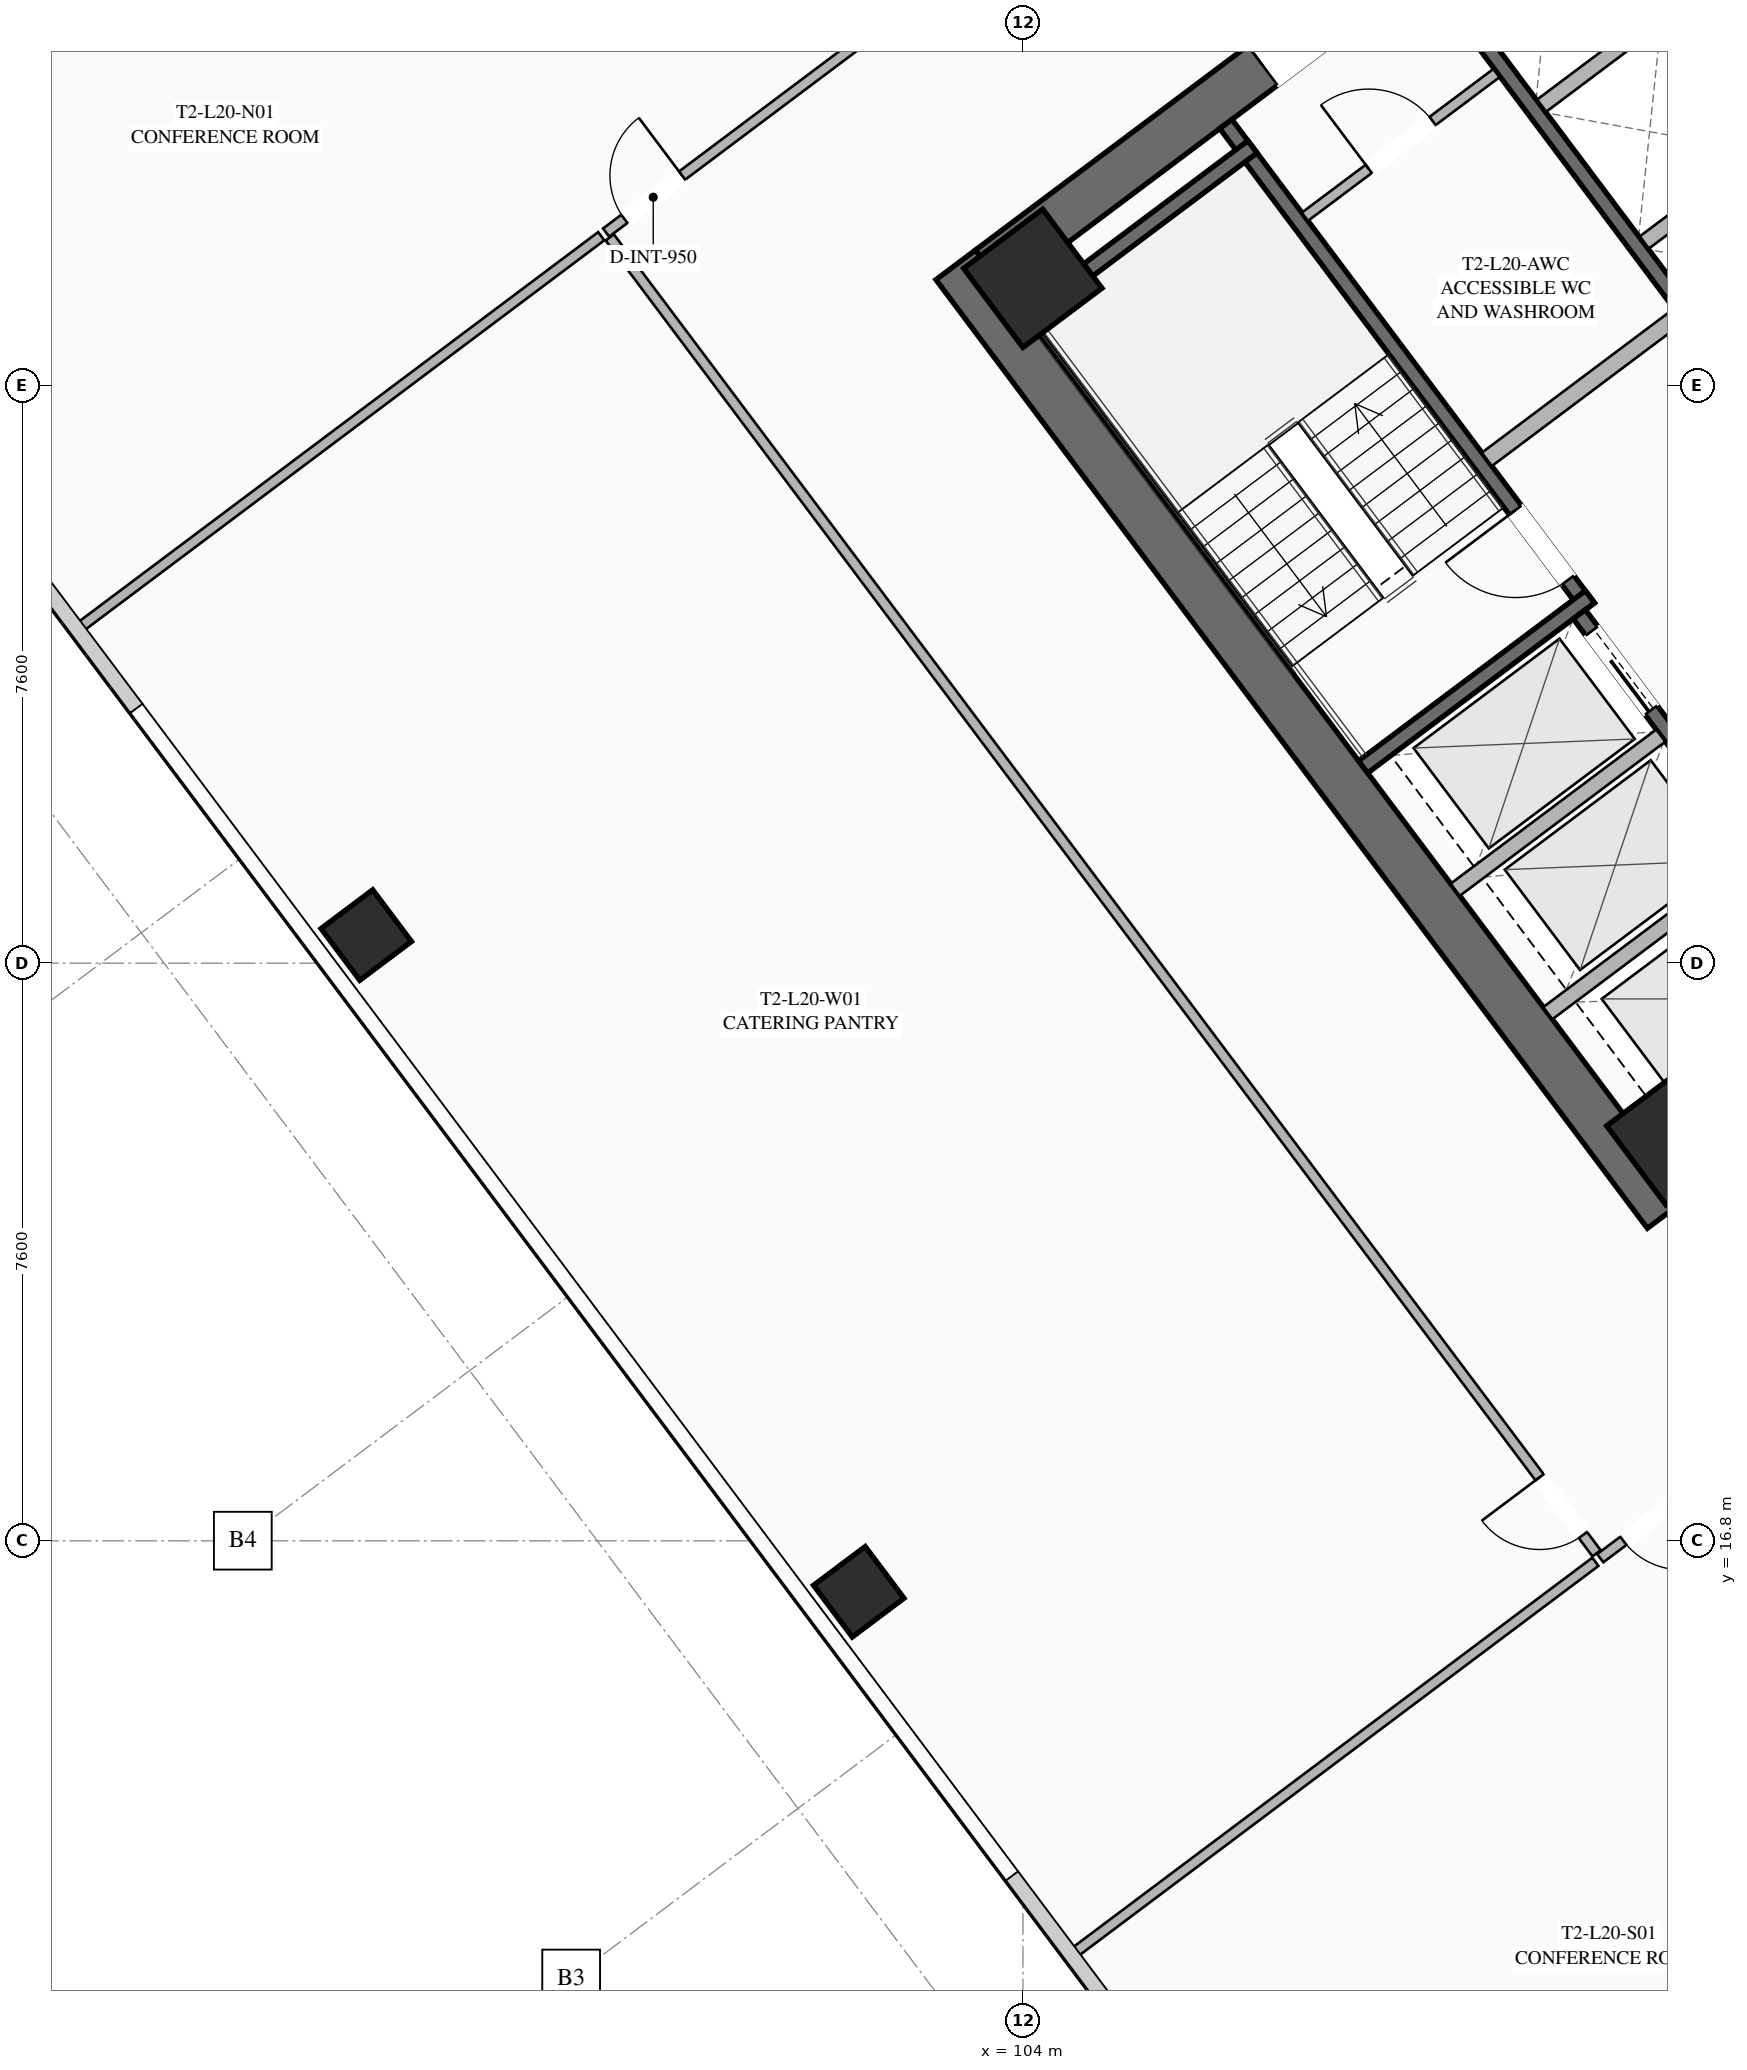
"""IFC4 building model, lengths in metres.
Left out: names, types, materials, properties, quantities, classifications, styles, units other than length and angle.
Written with IfcOpenShell. Run it as: python <this file> out.ifc"""

import sys

from ifc_helpers import new_model, si_unit, direction, frame, frame_2d, origin, origin_2d, place, context, subcontext, project, spatial, rectangle, hollow_rectangle, extrude, element, fill, save


model = new_model("IFC4")
c1 = context("Model", 3, precision=1e-05, world=origin(), true_north=direction((0.0, 1.0)))
c2 = subcontext(c1, "Body", "Model", "MODEL_VIEW")
j1 = project(units=[si_unit("LENGTHUNIT", "METRE"), si_unit("PLANEANGLEUNIT", "RADIAN")], contexts=[c1])
p1 = place(None, origin())
s1 = spatial("IfcSite", under=j1, at=p1, CompositionType="ELEMENT")
p2 = place(p1, origin())
s2 = spatial("IfcBuilding", under=s1, at=p2, CompositionType="ELEMENT")
p3 = place(p2, frame((0.0, 0.0, 77.85)))
s3 = spatial("IfcBuildingStorey", under=s2, at=p3, CompositionType="ELEMENT", Elevation=77.85)
p4 = place(p3, frame((112.476, 21.107, 0.0), z_axis=(0.0, 0.0, 1.0), x_axis=(-0.600005007985, 0.799996243986, 0.0)))
e1 = element("IfcWall", 1, at=p4, inside=s3, PredefinedType="SHEAR", context=c2, shape_type="SweptSolid", body=[
    extrude(rectangle(XDim=15.6, YDim=0.65, at=frame_2d((7.8, 0.0))), origin(), (0.0, 0.0, 1.0), 3.55),
])
p5 = place(p3, frame((124.429, 30.478, 0.0), z_axis=(0.0, 0.0, 1.0), x_axis=(-0.799998028465, -0.600002628705, 0.0)))
e2 = element("IfcWall", 2, at=p5, inside=s3, PredefinedType="SHEAR", context=c2, shape_type="SweptSolid", body=[
    extrude(rectangle(XDim=14.86, YDim=0.65, at=frame_2d((7.43, 0.0))), origin(), (0.0, 0.0, 1.0), 3.55),
])
p6 = place(p5, frame((9.13, 0.0, 0.0)))
e3 = element("IfcOpeningElement", 3, at=p6, cuts=e2, PredefinedType="OPENING", context=c2, shape_type="SweptSolid", body=[
    extrude(rectangle(XDim=1.25, YDim=2.25, at=frame_2d((0.625, 1.125))), frame((0.0, 0.335, 0.0), z_axis=(0.0, -1.0, 0.0), x_axis=(1.0, 0.0, 0.0)), (0.0, 0.0, 1.0), 0.67),
])
p7 = place(p5, frame((4.08, 0.0, 0.0)))
e4 = element("IfcOpeningElement", 4, at=p7, cuts=e2, PredefinedType="OPENING", context=c2, shape_type="SweptSolid", body=[
    extrude(rectangle(XDim=1.25, YDim=2.25, at=frame_2d((0.625, 1.125))), frame((0.0, 0.335, 0.0), z_axis=(0.0, -1.0, 0.0), x_axis=(1.0, 0.0, 0.0)), (0.0, 0.0, 1.0), 0.67),
])
p8 = place(p3, frame((103.571, 33.522, 0.0), z_axis=(0.0, 0.0, 1.0), x_axis=(0.799998028465, 0.600002628705, 0.0)))
e5 = element("IfcWall", 5, at=p8, inside=s3, PredefinedType="SHEAR", context=c2, shape_type="SweptSolid", body=[
    extrude(rectangle(XDim=14.86, YDim=0.65, at=frame_2d((7.43, 0.0))), origin(), (0.0, 0.0, 1.0), 3.55),
])
p9 = place(p8, frame((4.48, 0.0, 0.0)))
e6 = element("IfcOpeningElement", 6, at=p9, cuts=e5, PredefinedType="OPENING", context=c2, shape_type="SweptSolid", body=[
    extrude(rectangle(XDim=1.25, YDim=2.25, at=frame_2d((0.625, 1.125))), frame((0.0, 0.335, 0.0), z_axis=(0.0, -1.0, 0.0), x_axis=(1.0, 0.0, 0.0)), (0.0, 0.0, 1.0), 0.67),
])
p10 = place(p8, frame((9.53, 0.0, 0.0)))
e7 = element("IfcOpeningElement", 7, at=p10, cuts=e5, PredefinedType="OPENING", context=c2, shape_type="SweptSolid", body=[
    extrude(rectangle(XDim=1.25, YDim=2.25, at=frame_2d((0.625, 1.125))), frame((0.0, 0.335, 0.0), z_axis=(0.0, -1.0, 0.0), x_axis=(1.0, 0.0, 0.0)), (0.0, 0.0, 1.0), 0.67),
])
for number, where, z_axis, x_axis in (
    (8, (112.59, 22.13, 0.0), (0.0, 0.0, 1.0), (0.8, 0.6, 0.0)),
    (9, (104.13, 33.41, 0.0), (0.0, 0.0, 1.0), (0.8, 0.6, 0.0)),
):
    element("IfcColumn", number, at=place(p3, frame(where, z_axis=z_axis, x_axis=x_axis)), inside=s3, PredefinedType="COLUMN", context=c2, shape_type="SweptSolid", body=[
        extrude(hollow_rectangle(XDim=1.3, YDim=1.3, WallThickness=0.05, at=origin_2d()), origin(), (0.0, 0.0, 1.0), 3.35),
    ])
for number, where, z_axis, x_axis in (
    (10, (95.36, 24.77, 0.0), (0.0, 0.0, 1.0), (0.8, 0.6, 0.0)),
    (11, (101.84, 16.13, 0.0), (0.0, 0.0, 1.0), (0.8, 0.6, 0.0)),
):
    element("IfcColumn", number, at=place(p3, frame(where, z_axis=z_axis, x_axis=x_axis)), inside=s3, PredefinedType="COLUMN", context=c2, shape_type="SweptSolid", body=[
        extrude(hollow_rectangle(XDim=0.85, YDim=0.85, WallThickness=0.035, at=origin_2d()), origin(), (0.0, 0.0, 1.0), 3.35),
    ])
p11 = place(p3, frame((111.44, 29.08, 0.0), z_axis=(0.0, 0.0, 1.0), x_axis=(-0.600009827119, 0.799992629566, 0.0)))
e12 = element("IfcWall", 12, at=p11, inside=s3, PredefinedType="SHEAR", context=c2, shape_type="SweptSolid", body=[
    extrude(rectangle(XDim=7.95, YDim=0.2, at=frame_2d((3.975, 0.0))), origin(), (0.0, 0.0, 1.0), 3.35),
])
p12 = place(p11, frame((0.45, 0.0, 0.0)))
e13 = element("IfcOpeningElement", 13, at=p12, cuts=e12, PredefinedType="OPENING", context=c2, shape_type="SweptSolid", body=[
    extrude(rectangle(XDim=1.15, YDim=2.2, at=frame_2d((0.575, 1.1))), frame((0.0, 0.11, 0.0), z_axis=(0.0, -1.0, 0.0), x_axis=(1.0, 0.0, 0.0)), (0.0, 0.0, 1.0), 0.22),
])
for number, where, z_axis, x_axis in (
    (14, (108.476, 26.982, 0.0), (0.0, 0.0, 1.0), (0.8, 0.6, 0.0)),
    (15, (104.036, 32.902, 0.0), (0.0, 0.0, 1.0), (0.8, 0.6, 0.0)),
):
    element("IfcWall", number, at=place(p3, frame(where, z_axis=z_axis, x_axis=x_axis)), inside=s3, PredefinedType="SHEAR", context=c2, shape_type="SweptSolid", body=[
        extrude(rectangle(XDim=3.73, YDim=0.2, at=frame_2d((1.865, 0.0))), origin(), (0.0, 0.0, 1.0), 3.35),
    ])
p13 = place(p3, frame((117.938, 26.016, 0.0), z_axis=(0.0, 0.0, 1.0), x_axis=(-0.600005463273, 0.799995902516, 0.0)))
e16 = element("IfcWall", 16, at=p13, inside=s3, PredefinedType="SHEAR", context=c2, shape_type="SweptSolid", body=[
    extrude(rectangle(XDim=14.3, YDim=0.2, at=frame_2d((7.15, 0.0))), origin(), (0.0, 0.0, 1.0), 3.35),
])
p14 = place(p3, frame((110.104, 31.028, 0.0), z_axis=(0.0, 0.0, 1.0), x_axis=(0.800018601094, 0.59997519774, 0.0)))
e17 = element("IfcWall", 17, at=p14, inside=s3, PredefinedType="SOLIDWALL", context=c2, shape_type="SweptSolid", body=[
    extrude(rectangle(XDim=3.15, YDim=0.22, at=frame_2d((1.575, 0.0))), origin(), (0.0, 0.0, 1.0), 2.703),
])
p15 = place(p3, frame((115.13, 23.91, 0.0), z_axis=(0.0, 0.0, 1.0), x_axis=(-0.599975393228, 0.800018454488, 0.0)))
e18 = element("IfcWall", 18, at=p15, inside=s3, PredefinedType="SHEAR", context=c2, shape_type="SweptSolid", body=[
    extrude(rectangle(XDim=6.35, YDim=0.2, at=frame_2d((3.175, 0.0))), origin(), (0.0, 0.0, 1.0), 3.35),
])
p16 = place(p15, frame((4.775, 0.0, 0.0)))
e19 = element("IfcOpeningElement", 19, at=p16, cuts=e18, PredefinedType="OPENING", context=c2, shape_type="SweptSolid", body=[
    extrude(rectangle(XDim=1.3, YDim=2.25, at=frame_2d((0.65, 1.125))), frame((0.0, 0.11, 0.0), z_axis=(0.0, -1.0, 0.0), x_axis=(1.0, 0.0, 0.0)), (0.0, 0.0, 1.0), 0.22),
])
p17 = place(p15, frame((2.775, 0.0, 0.0)))
e20 = element("IfcOpeningElement", 20, at=p17, cuts=e18, PredefinedType="OPENING", context=c2, shape_type="SweptSolid", body=[
    extrude(rectangle(XDim=1.3, YDim=2.25, at=frame_2d((0.65, 1.125))), frame((0.0, 0.11, 0.0), z_axis=(0.0, -1.0, 0.0), x_axis=(1.0, 0.0, 0.0)), (0.0, 0.0, 1.0), 0.22),
])
p18 = place(p15, frame((0.575, 0.0, 0.0)))
e21 = element("IfcOpeningElement", 21, at=p18, cuts=e18, PredefinedType="OPENING", context=c2, shape_type="SweptSolid", body=[
    extrude(rectangle(XDim=1.3, YDim=2.25, at=frame_2d((0.65, 1.125))), frame((0.0, 0.11, 0.0), z_axis=(0.0, -1.0, 0.0), x_axis=(1.0, 0.0, 0.0)), (0.0, 0.0, 1.0), 0.22),
])
for number, where, z_axis, x_axis in (
    (22, (110.906, 23.742, 0.0), (0.0, 0.0, 1.0), (0.8, 0.6, 0.0)),
    (23, (109.688, 25.366, 0.0), (0.0, 0.0, 1.0), (0.8, 0.6, 0.0)),
):
    element("IfcWall", number, at=place(p3, frame(where, z_axis=z_axis, x_axis=x_axis)), inside=s3, PredefinedType="SOLIDWALL", context=c2, shape_type="SweptSolid", body=[
        extrude(rectangle(XDim=3.38, YDim=0.2, at=frame_2d((1.69, 0.0))), origin(), (0.0, 0.0, 1.0), 3.35),
    ])
p19 = place(p3, frame((107.71, 34.22, 0.0), z_axis=(0.0, 0.0, 1.0), x_axis=(0.799981399002, 0.60002480053, 0.0)))
e24 = element("IfcWall", 24, at=p19, inside=s3, PredefinedType="PARTITIONING", context=c2, shape_type="SweptSolid", body=[
    extrude(rectangle(XDim=3.15, YDim=0.135, at=frame_2d((1.575, 0.0))), origin(), (0.0, 0.0, 1.0), 2.703),
])
p20 = place(p19, frame((1.05, 0.0, 0.0)))
e25 = element("IfcOpeningElement", 25, at=p20, cuts=e24, PredefinedType="OPENING", context=c2, shape_type="SweptSolid", body=[
    extrude(rectangle(XDim=1.05, YDim=2.2, at=frame_2d((0.525, 1.1))), frame((0.0, 0.077, 0.0), z_axis=(0.0, -1.0, 0.0), x_axis=(1.0, 0.0, 0.0)), (0.0, 0.0, 1.0), 0.155),
])
p21 = place(p3, frame((115.11, 33.27, 0.0), z_axis=(0.0, 0.0, 1.0), x_axis=(-0.600011488909, 0.79999138319, 0.0)))
e26 = element("IfcWall", 26, at=p21, inside=s3, PredefinedType="SOLIDWALL", context=c2, shape_type="SweptSolid", body=[
    extrude(rectangle(XDim=6.8, YDim=0.2, at=frame_2d((3.4, 0.0))), origin(), (0.0, 0.0, 1.0), 3.35),
])
p22 = place(p3, frame((112.176, 33.882, 0.0), z_axis=(0.0, 0.0, 1.0), x_axis=(0.8, 0.6, 0.0)))
e27 = element("IfcWall", 27, at=p22, inside=s3, PredefinedType="SOLIDWALL", context=c2, shape_type="SweptSolid", body=[
    extrude(rectangle(XDim=1.88, YDim=0.2, at=frame_2d((0.94, 0.0))), origin(), (0.0, 0.0, 1.0), 3.35),
])
p23 = place(p3, frame((110.826, 35.682, 0.0), z_axis=(0.0, 0.0, 1.0), x_axis=(0.799984418148, 0.600020775241, 0.0)))
e28 = element("IfcWall", 28, at=p23, inside=s3, PredefinedType="SOLIDWALL", context=c2, shape_type="SweptSolid", body=[
    extrude(rectangle(XDim=1.88, YDim=0.2, at=frame_2d((0.94, 0.0))), origin(), (0.0, 0.0, 1.0), 3.35),
])
p24 = place(p3, frame((98.516, 34.012, 0.0), z_axis=(0.0, 0.0, 1.0), x_axis=(0.8, 0.6, 0.0)))
e29 = element("IfcWall", 29, at=p24, inside=s3, PredefinedType="PARTITIONING", context=c2, shape_type="SweptSolid", body=[
    extrude(rectangle(XDim=28.23, YDim=0.135, at=frame_2d((14.115, 0.0))), origin(), (0.0, 0.0, 1.0), 2.703),
])
p25 = place(p24, frame((0.3, 0.0, 0.0)))
e30 = element("IfcOpeningElement", 30, at=p25, cuts=e29, PredefinedType="OPENING", context=c2, shape_type="SweptSolid", body=[
    extrude(rectangle(XDim=0.95, YDim=2.05, at=frame_2d((0.475, 1.025))), frame((0.0, 0.077, 0.0), z_axis=(0.0, -1.0, 0.0), x_axis=(1.0, 0.0, 0.0)), (0.0, 0.0, 1.0), 0.155),
])
p26 = place(p24, frame((11.004, 0.0, 0.0)))
e31 = element("IfcOpeningElement", 31, at=p26, cuts=e29, PredefinedType="OPENING", context=c2, shape_type="SweptSolid", body=[
    extrude(rectangle(XDim=0.95, YDim=2.05, at=frame_2d((0.475, 1.025))), frame((0.0, 0.077, 0.0), z_axis=(0.0, -1.0, 0.0), x_axis=(1.0, 0.0, 0.0)), (0.0, 0.0, 1.0), 0.155),
])
p27 = place(p24, frame((26.98, 0.0, 0.0)))
e32 = element("IfcOpeningElement", 32, at=p27, cuts=e29, PredefinedType="OPENING", context=c2, shape_type="SweptSolid", body=[
    extrude(rectangle(XDim=0.95, YDim=2.05, at=frame_2d((0.475, 1.025))), frame((0.0, 0.077, 0.0), z_axis=(0.0, -1.0, 0.0), x_axis=(1.0, 0.0, 0.0)), (0.0, 0.0, 1.0), 0.155),
])
p28 = place(p3, frame((134.18, 33.51, 0.0), z_axis=(0.0, 0.0, 1.0), x_axis=(-0.8, -0.6, 0.0)))
e33 = element("IfcWall", 33, at=p28, inside=s3, PredefinedType="PARTITIONING", context=c2, shape_type="SweptSolid", body=[
    extrude(rectangle(XDim=28.23, YDim=0.135, at=frame_2d((14.115, 0.0))), origin(), (0.0, 0.0, 1.0), 2.703),
])
p29 = place(p28, frame((26.9, 0.0, 0.0)))
e34 = element("IfcOpeningElement", 34, at=p29, cuts=e33, PredefinedType="OPENING", context=c2, shape_type="SweptSolid", body=[
    extrude(rectangle(XDim=0.95, YDim=2.05, at=frame_2d((0.475, 1.025))), frame((0.0, 0.077, 0.0), z_axis=(0.0, -1.0, 0.0), x_axis=(1.0, 0.0, 0.0)), (0.0, 0.0, 1.0), 0.155),
])
p30 = place(p28, frame((16.453, 0.0, 0.0)))
e35 = element("IfcOpeningElement", 35, at=p30, cuts=e33, PredefinedType="OPENING", context=c2, shape_type="SweptSolid", body=[
    extrude(rectangle(XDim=0.95, YDim=2.05, at=frame_2d((0.475, 1.025))), frame((0.0, 0.077, 0.0), z_axis=(0.0, -1.0, 0.0), x_axis=(1.0, 0.0, 0.0)), (0.0, 0.0, 1.0), 0.155),
])
p31 = place(p28, frame((0.38, 0.0, 0.0)))
e36 = element("IfcOpeningElement", 36, at=p31, cuts=e33, PredefinedType="OPENING", context=c2, shape_type="SweptSolid", body=[
    extrude(rectangle(XDim=0.95, YDim=2.05, at=frame_2d((0.475, 1.025))), frame((0.0, 0.077, 0.0), z_axis=(0.0, -1.0, 0.0), x_axis=(1.0, 0.0, 0.0)), (0.0, 0.0, 1.0), 0.155),
])
p32 = place(p3, frame((111.548, 16.636, 0.0), z_axis=(0.0, 0.0, 1.0), x_axis=(-0.600003610192, 0.799997292343, 0.0)))
e37 = element("IfcWall", 37, at=p32, inside=s3, PredefinedType="PARTITIONING", context=c2, shape_type="SweptSolid", body=[
    extrude(rectangle(XDim=21.64, YDim=0.135, at=frame_2d((10.82, 0.0))), origin(), (0.0, 0.0, 1.0), 2.703),
])
p33 = place(p32, frame((0.3, 0.0, 0.0)))
e38 = element("IfcOpeningElement", 38, at=p33, cuts=e37, PredefinedType="OPENING", context=c2, shape_type="SweptSolid", body=[
    extrude(rectangle(XDim=0.95, YDim=2.05, at=frame_2d((0.475, 1.025))), frame((0.0, 0.077, 0.0), z_axis=(0.0, -1.0, 0.0), x_axis=(1.0, 0.0, 0.0)), (0.0, 0.0, 1.0), 0.155),
])
p34 = place(p3, frame((98.452, 33.964, 0.0), z_axis=(0.0, 0.0, 1.0), x_axis=(-0.799993202584, -0.600009063115, 0.0)))
e39 = element("IfcWall", 39, at=p34, inside=s3, PredefinedType="PARTITIONING", context=c2, shape_type="SweptSolid", body=[
    extrude(rectangle(XDim=8.62, YDim=0.135, at=frame_2d((4.31, 0.0))), origin(), (0.0, 0.0, 1.0), 2.703),
])
p35 = place(p3, frame((104.636, 11.352, 0.0), z_axis=(0.0, 0.0, 1.0), x_axis=(0.800006797429, 0.599990936654, 0.0)))
e40 = element("IfcWall", 40, at=p35, inside=s3, PredefinedType="PARTITIONING", context=c2, shape_type="SweptSolid", body=[
    extrude(rectangle(XDim=8.62, YDim=0.135, at=frame_2d((4.31, 0.0))), origin(), (0.0, 0.0, 1.0), 2.703),
])
p36 = place(p9, origin())
e41 = element("IfcDoor", 41, at=p36, inside=s3, OperationType="SINGLE_SWING_LEFT", PredefinedType="DOOR", context=c2, shape_type="SweptSolid", body=[
    extrude(rectangle(XDim=1.25, YDim=2.25, at=frame_2d((0.625, 1.125))), frame((0.0, 0.025, 0.0), z_axis=(0.0, -1.0, 0.0), x_axis=(1.0, 0.0, 0.0)), (0.0, 0.0, 1.0), 0.05),
])
fill(e6, e41)
p37 = place(p12, origin())
e42 = element("IfcDoor", 42, at=p37, inside=s3, OperationType="SINGLE_SWING_RIGHT", PredefinedType="DOOR", context=c2, shape_type="SweptSolid", body=[
    extrude(rectangle(XDim=1.15, YDim=2.2, at=frame_2d((0.575, 1.1))), frame((0.0, 0.025, 0.0), z_axis=(0.0, -1.0, 0.0), x_axis=(1.0, 0.0, 0.0)), (0.0, 0.0, 1.0), 0.05),
])
fill(e13, e42)
p38 = place(p20, origin())
e43 = element("IfcDoor", 43, at=p38, inside=s3, OperationType="SINGLE_SWING_LEFT", PredefinedType="DOOR", context=c2, shape_type="SweptSolid", body=[
    extrude(rectangle(XDim=1.05, YDim=2.2, at=frame_2d((0.525, 1.1))), frame((0.0, 0.025, 0.0), z_axis=(0.0, -1.0, 0.0), x_axis=(1.0, 0.0, 0.0)), (0.0, 0.0, 1.0), 0.05),
])
fill(e25, e43)
p39 = place(p25, origin())
e44 = element("IfcDoor", 44, at=p39, inside=s3, OperationType="SINGLE_SWING_RIGHT", PredefinedType="DOOR", context=c2, shape_type="SweptSolid", body=[
    extrude(rectangle(XDim=0.95, YDim=2.05, at=frame_2d((0.475, 1.025))), frame((0.0, 0.025, 0.0), z_axis=(0.0, -1.0, 0.0), x_axis=(1.0, 0.0, 0.0)), (0.0, 0.0, 1.0), 0.05),
])
fill(e30, e44)
p40 = place(p29, origin())
e45 = element("IfcDoor", 45, at=p40, inside=s3, OperationType="SINGLE_SWING_LEFT", PredefinedType="DOOR", context=c2, shape_type="SweptSolid", body=[
    extrude(rectangle(XDim=0.95, YDim=2.05, at=frame_2d((0.475, 1.025))), frame((0.0, 0.025, 0.0), z_axis=(0.0, -1.0, 0.0), x_axis=(1.0, 0.0, 0.0)), (0.0, 0.0, 1.0), 0.05),
])
fill(e34, e45)
p41 = place(p33, origin())
e46 = element("IfcDoor", 46, at=p41, inside=s3, OperationType="SINGLE_SWING_RIGHT", PredefinedType="DOOR", context=c2, shape_type="SweptSolid", body=[
    extrude(rectangle(XDim=0.95, YDim=2.05, at=frame_2d((0.475, 1.025))), frame((0.0, 0.025, 0.0), z_axis=(0.0, -1.0, 0.0), x_axis=(1.0, 0.0, 0.0)), (0.0, 0.0, 1.0), 0.05),
])
fill(e38, e46)
p42 = place(p16, origin())
e47 = element("IfcDoor", 47, at=p42, inside=s3, OperationType="SLIDING_TO_LEFT", PredefinedType="DOOR", context=c2, shape_type="SweptSolid", body=[
    extrude(rectangle(XDim=1.3, YDim=2.25, at=frame_2d((0.65, 1.125))), frame((0.0, 0.025, 0.0), z_axis=(0.0, -1.0, 0.0), x_axis=(1.0, 0.0, 0.0)), (0.0, 0.0, 1.0), 0.05),
])
fill(e19, e47)
save(model, sys.argv[1])
